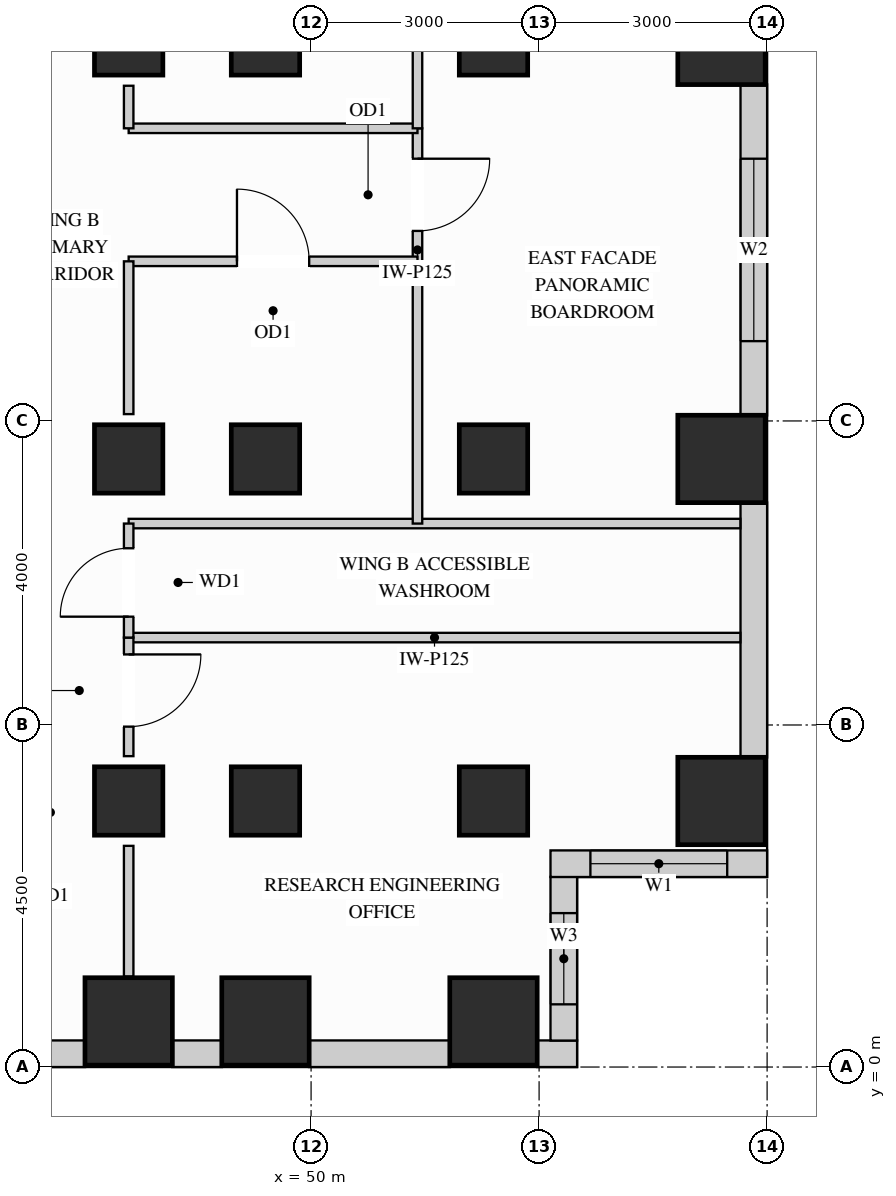
"""IFC4 building model, lengths in metres.
Left out: names, types, materials, properties, quantities, classifications, styles, units other than length and angle.
Written with IfcOpenShell. Run it as: python <this file> out.ifc"""

import sys

from ifc_helpers import new_model, si_unit, direction, frame, frame_2d, origin, origin_2d, place, context, subcontext, project, spatial, rectangle, extrude, source, transform, mapped, element, fill, save


model = new_model("IFC4")
c1 = context("Model", 3, precision=1e-05, world=origin(), true_north=direction((0.0, 1.0)))
c2 = subcontext(c1, "Body", "Model", "MODEL_VIEW")
j1 = project(units=[si_unit("LENGTHUNIT", "METRE"), si_unit("PLANEANGLEUNIT", "RADIAN")], contexts=[c1])
p1 = place(None, origin())
s1 = spatial("IfcSite", under=j1, at=p1, CompositionType="ELEMENT")
p2 = place(p1, origin())
s2 = spatial("IfcBuilding", under=s1, at=p2, CompositionType="ELEMENT")
p3 = place(p2, frame((0.0, 0.0, 95.4)))
s3 = spatial("IfcBuildingStorey", under=s2, at=p3, CompositionType="ELEMENT", Elevation=95.4)
m1 = source(origin(), c2, "Body", "SweptSolid", [
    extrude(rectangle(XDim=0.9, YDim=0.9, at=origin_2d()), origin(), (0.0, 0.0, 1.0), 3.38),
])
for number, where, z_axis, x_axis in (
    (1, (47.6, 13.5, 0.0), (0.0, 0.0, 1.0), (1.0, 0.0, 0.0)),
    (2, (47.6, 3.5, 0.0), (0.0, 0.0, 1.0), (1.0, 0.0, 0.0)),
    (3, (47.6, 8.0, 0.0), (0.0, 0.0, 1.0), (1.0, 0.0, 0.0)),
    (4, (49.4, 13.5, 0.0), (0.0, 0.0, 1.0), (1.0, 0.0, 0.0)),
    (5, (49.4, 3.5, 0.0), (0.0, 0.0, 1.0), (1.0, 0.0, 0.0)),
    (6, (49.4, 8.0, 0.0), (0.0, 0.0, 1.0), (1.0, 0.0, 0.0)),
    (7, (52.4, 13.5, 0.0), (0.0, 0.0, 1.0), (1.0, 0.0, 0.0)),
    (8, (52.4, 3.5, 0.0), (0.0, 0.0, 1.0), (1.0, 0.0, 0.0)),
    (9, (52.4, 8.0, 0.0), (0.0, 0.0, 1.0), (1.0, 0.0, 0.0)),
):
    element("IfcColumn", number, at=place(p3, frame(where, z_axis=z_axis, x_axis=x_axis)), inside=s3, PredefinedType="COLUMN", context=c2, shape_type="MappedRepresentation", body=[
        mapped(m1, transform((0.0, 0.0, 0.0), x_axis=(1.0, 0.0, 0.0), y_axis=(0.0, 1.0, 0.0), z_axis=(0.0, 0.0, 1.0))),
    ])
m2 = source(origin(), c2, "Body", "SweptSolid", [
    extrude(rectangle(XDim=1.15, YDim=1.15, at=origin_2d()), origin(), (0.0, 0.0, 1.0), 3.38),
])
for number, where, z_axis, x_axis in (
    (10, (55.4, 13.5, 0.0), (0.0, 0.0, 1.0), (1.0, 0.0, 0.0)),
    (11, (55.4, 3.5, 0.0), (0.0, 0.0, 1.0), (1.0, 0.0, 0.0)),
    (12, (55.4, 8.0, 0.0), (0.0, 0.0, 1.0), (1.0, 0.0, 0.0)),
    (13, (47.6, 0.6, 0.0), (0.0, 0.0, 1.0), (1.0, 0.0, 0.0)),
    (14, (49.4, 0.6, 0.0), (0.0, 0.0, 1.0), (1.0, 0.0, 0.0)),
    (15, (52.4, 0.6, 0.0), (0.0, 0.0, 1.0), (1.0, 0.0, 0.0)),
):
    element("IfcColumn", number, at=place(p3, frame(where, z_axis=z_axis, x_axis=x_axis)), inside=s3, PredefinedType="COLUMN", context=c2, shape_type="MappedRepresentation", body=[
        mapped(m2, transform((0.0, 0.0, 0.0), x_axis=(1.0, 0.0, 0.0), y_axis=(0.0, 1.0, 0.0), z_axis=(0.0, 0.0, 1.0))),
    ])
p4 = place(p3, frame((40.573, 0.175, 0.0), z_axis=(0.0, 0.0, 1.0), x_axis=(1.0, 0.0, 0.0)))
e16 = element("IfcWall", 16, at=p4, inside=s3, PredefinedType="SOLIDWALL", context=c2, shape_type="SweptSolid", body=[
    extrude(rectangle(XDim=6.454, YDim=0.35, at=frame_2d((3.227, 0.0))), origin(), (0.0, 0.0, 1.0), 3.365),
])
p5 = place(p4, frame((0.712, 0.0, 0.78)))
e17 = element("IfcOpeningElement", 17, at=p5, cuts=e16, PredefinedType="OPENING", context=c2, shape_type="SweptSolid", body=[
    extrude(rectangle(XDim=1.8, YDim=2.1, at=frame_2d((0.9, 1.05))), frame((0.0, 0.185, 0.0), z_axis=(0.0, -1.0, 0.0), x_axis=(1.0, 0.0, 0.0)), (0.0, 0.0, 1.0), 0.37),
])
p6 = place(p4, frame((2.905, 0.0, 0.78)))
e18 = element("IfcOpeningElement", 18, at=p6, cuts=e16, PredefinedType="OPENING", context=c2, shape_type="SweptSolid", body=[
    extrude(rectangle(XDim=1.8, YDim=2.1, at=frame_2d((0.9, 1.05))), frame((0.0, 0.185, 0.0), z_axis=(0.0, -1.0, 0.0), x_axis=(1.0, 0.0, 0.0)), (0.0, 0.0, 1.0), 0.37),
])
m3 = source(origin(), c2, "Body", "SweptSolid", [
    extrude(rectangle(XDim=0.654, YDim=0.35, at=frame_2d((0.327, 0.0))), origin(), (0.0, 0.0, 1.0), 3.365),
])
p7 = place(p3, frame((48.173, 0.175, 0.0), z_axis=(0.0, 0.0, 1.0), x_axis=(1.0, 0.0, 0.0)))
e19 = element("IfcWall", 19, at=p7, inside=s3, PredefinedType="SOLIDWALL", context=c2, shape_type="MappedRepresentation", body=[
    mapped(m3, transform((0.0, 0.0, 0.0), x_axis=(1.0, 0.0, 0.0), y_axis=(0.0, 1.0, 0.0), z_axis=(0.0, 0.0, 1.0))),
])
m4 = source(origin(), c2, "Body", "SweptSolid", [
    extrude(rectangle(XDim=1.854, YDim=0.35, at=frame_2d((0.927, 0.0))), origin(), (0.0, 0.0, 1.0), 3.365),
])
p8 = place(p3, frame((49.973, 0.175, 0.0), z_axis=(0.0, 0.0, 1.0), x_axis=(1.0, 0.0, 0.0)))
e20 = element("IfcWall", 20, at=p8, inside=s3, PredefinedType="SOLIDWALL", context=c2, shape_type="MappedRepresentation", body=[
    mapped(m4, transform((0.0, 0.0, 0.0), x_axis=(1.0, 0.0, 0.0), y_axis=(0.0, 1.0, 0.0), z_axis=(0.0, 0.0, 1.0))),
])
m5 = source(origin(), c2, "Body", "SweptSolid", [
    extrude(rectangle(XDim=0.527, YDim=0.35, at=frame_2d((0.264, 0.0))), origin(), (0.0, 0.0, 1.0), 3.365),
])
p9 = place(p3, frame((52.973, 0.175, 0.0), z_axis=(0.0, 0.0, 1.0), x_axis=(1.0, 0.0, 0.0)))
e21 = element("IfcWall", 21, at=p9, inside=s3, PredefinedType="SOLIDWALL", context=c2, shape_type="MappedRepresentation", body=[
    mapped(m5, transform((0.0, 0.0, 0.0), x_axis=(1.0, 0.0, 0.0), y_axis=(0.0, 1.0, 0.0), z_axis=(0.0, 0.0, 1.0))),
])
p10 = place(p3, frame((53.325, 0.348, 0.0), z_axis=(0.0, 0.0, 1.0), x_axis=(0.0, 1.0, 0.0)))
e22 = element("IfcWall", 22, at=p10, inside=s3, PredefinedType="SOLIDWALL", context=c2, shape_type="SweptSolid", body=[
    extrude(rectangle(XDim=2.154, YDim=0.35, at=frame_2d((1.077, 0.0))), origin(), (0.0, 0.0, 1.0), 3.365),
])
p11 = place(p10, frame((0.477, 0.0, 0.78)))
e23 = element("IfcOpeningElement", 23, at=p11, cuts=e22, PredefinedType="OPENING", context=c2, shape_type="SweptSolid", body=[
    extrude(rectangle(XDim=1.2, YDim=2.1, at=frame_2d((0.6, 1.05))), frame((0.0, 0.185, 0.0), z_axis=(0.0, -1.0, 0.0), x_axis=(1.0, 0.0, 0.0)), (0.0, 0.0, 1.0), 0.37),
])
p12 = place(p3, frame((53.15, 2.675, 0.0), z_axis=(0.0, 0.0, 1.0), x_axis=(1.0, 0.0, 0.0)))
e24 = element("IfcWall", 24, at=p12, inside=s3, PredefinedType="SOLIDWALL", context=c2, shape_type="SweptSolid", body=[
    extrude(rectangle(XDim=2.85, YDim=0.35, at=frame_2d((1.425, 0.0))), origin(), (0.0, 0.0, 1.0), 3.365),
])
p13 = place(p12, frame((0.525, 0.0, 0.78)))
e25 = element("IfcOpeningElement", 25, at=p13, cuts=e24, PredefinedType="OPENING", context=c2, shape_type="SweptSolid", body=[
    extrude(rectangle(XDim=1.8, YDim=2.1, at=frame_2d((0.9, 1.05))), frame((0.0, 0.185, 0.0), z_axis=(0.0, -1.0, 0.0), x_axis=(1.0, 0.0, 0.0)), (0.0, 0.0, 1.0), 0.37),
])
m6 = source(origin(), c2, "Body", "SweptSolid", [
    extrude(rectangle(XDim=3.354, YDim=0.35, at=frame_2d((1.677, 0.0))), origin(), (0.0, 0.0, 1.0), 3.365),
])
p14 = place(p3, frame((55.825, 4.073, 0.0), z_axis=(0.0, 0.0, 1.0), x_axis=(0.0, 1.0, 0.0)))
e26 = element("IfcWall", 26, at=p14, inside=s3, PredefinedType="SOLIDWALL", context=c2, shape_type="MappedRepresentation", body=[
    mapped(m6, transform((0.0, 0.0, 0.0), x_axis=(1.0, 0.0, 0.0), y_axis=(0.0, 1.0, 0.0), z_axis=(0.0, 0.0, 1.0))),
])
p15 = place(p3, frame((55.825, 8.573, 0.0), z_axis=(0.0, 0.0, 1.0), x_axis=(0.0, 1.0, 0.0)))
e27 = element("IfcWall", 27, at=p15, inside=s3, PredefinedType="SOLIDWALL", context=c2, shape_type="SweptSolid", body=[
    extrude(rectangle(XDim=4.354, YDim=0.35, at=frame_2d((2.177, 0.0))), origin(), (0.0, 0.0, 1.0), 3.365),
])
p16 = place(p15, frame((0.977, 0.0, 0.78)))
e28 = element("IfcOpeningElement", 28, at=p16, cuts=e27, PredefinedType="OPENING", context=c2, shape_type="SweptSolid", body=[
    extrude(rectangle(XDim=2.4, YDim=2.1, at=frame_2d((1.2, 1.05))), frame((0.0, 0.185, 0.0), z_axis=(0.0, -1.0, 0.0), x_axis=(1.0, 0.0, 0.0)), (0.0, 0.0, 1.0), 0.37),
])
p17 = place(p3, frame((51.4, 10.6, 0.0), z_axis=(0.0, 0.0, 1.0), x_axis=(0.0, 1.0, 0.0)))
e29 = element("IfcWall", 29, at=p17, inside=s3, PredefinedType="PARTITIONING", context=c2, shape_type="SweptSolid", body=[
    extrude(rectangle(XDim=1.75, YDim=0.125, at=frame_2d((0.875, 0.0))), origin(), (0.0, 0.0, 1.0), 3.365),
])
p18 = place(p17, frame((0.4, 0.0, 0.0)))
e30 = element("IfcOpeningElement", 30, at=p18, cuts=e29, PredefinedType="OPENING", context=c2, shape_type="SweptSolid", body=[
    extrude(rectangle(XDim=0.95, YDim=2.15, at=frame_2d((0.475, 1.075))), frame((0.0, 0.073, 0.0), z_axis=(0.0, -1.0, 0.0), x_axis=(1.0, 0.0, 0.0)), (0.0, 0.0, 1.0), 0.145),
])
m7 = source(origin(), c2, "Body", "SweptSolid", [
    extrude(rectangle(XDim=8.048, YDim=0.125, at=frame_2d((4.024, 0.0))), origin(), (0.0, 0.0, 1.0), 3.365),
])
for number, where, z_axis, x_axis in (
    (31, (47.6, 5.65, 0.0), (0.0, 0.0, 1.0), (1.0, 0.0, 0.0)),
    (32, (47.6, 7.15, 0.0), (0.0, 0.0, 1.0), (1.0, 0.0, 0.0)),
):
    element("IfcWall", number, at=place(p3, frame(where, z_axis=z_axis, x_axis=x_axis)), inside=s3, PredefinedType="PARTITIONING", context=c2, shape_type="MappedRepresentation", body=[
        mapped(m7, transform((0.0, 0.0, 0.0), x_axis=(1.0, 0.0, 0.0), y_axis=(0.0, 1.0, 0.0), z_axis=(0.0, 0.0, 1.0))),
    ])
m8 = source(origin(), c2, "Body", "SweptSolid", [
    extrude(rectangle(XDim=3.8, YDim=0.125, at=frame_2d((1.9, 0.0))), origin(), (0.0, 0.0, 1.0), 3.365),
])
p19 = place(p3, frame((47.6, 12.35, 0.0), z_axis=(0.0, 0.0, 1.0), x_axis=(1.0, 0.0, 0.0)))
e33 = element("IfcWall", 33, at=p19, inside=s3, PredefinedType="PARTITIONING", context=c2, shape_type="MappedRepresentation", body=[
    mapped(m8, transform((0.0, 0.0, 0.0), x_axis=(1.0, 0.0, 0.0), y_axis=(0.0, 1.0, 0.0), z_axis=(0.0, 0.0, 1.0))),
])
p20 = place(p3, frame((47.6, 10.6, 0.0), z_axis=(0.0, 0.0, 1.0), x_axis=(1.0, 0.0, 0.0)))
e34 = element("IfcWall", 34, at=p20, inside=s3, PredefinedType="PARTITIONING", context=c2, shape_type="SweptSolid", body=[
    extrude(rectangle(XDim=3.8, YDim=0.125, at=frame_2d((1.9, 0.0))), origin(), (0.0, 0.0, 1.0), 2.677),
])
p21 = place(p20, frame((1.425, 0.0, 0.0)))
e35 = element("IfcOpeningElement", 35, at=p21, cuts=e34, PredefinedType="OPENING", context=c2, shape_type="SweptSolid", body=[
    extrude(rectangle(XDim=0.95, YDim=2.15, at=frame_2d((0.475, 1.075))), frame((0.0, 0.073, 0.0), z_axis=(0.0, -1.0, 0.0), x_axis=(1.0, 0.0, 0.0)), (0.0, 0.0, 1.0), 0.145),
])
m9 = source(origin(), c2, "Body", "SweptSolid", [
    extrude(rectangle(XDim=3.45, YDim=0.125, at=frame_2d((1.725, 0.0))), origin(), (0.0, 0.0, 1.0), 3.365),
])
p22 = place(p3, frame((51.4, 7.15, 0.0), z_axis=(0.0, 0.0, 1.0), x_axis=(0.0, 1.0, 0.0)))
e36 = element("IfcWall", 36, at=p22, inside=s3, PredefinedType="PARTITIONING", context=c2, shape_type="MappedRepresentation", body=[
    mapped(m9, transform((0.0, 0.0, 0.0), x_axis=(1.0, 0.0, 0.0), y_axis=(0.0, 1.0, 0.0), z_axis=(0.0, 0.0, 1.0))),
])
m10 = source(origin(), c2, "Body", "SweptSolid", [
    extrude(rectangle(XDim=9.79, YDim=0.125, at=frame_2d((4.895, 0.0))), origin(), (0.0, 0.0, 1.0), 3.365),
])
p23 = place(p3, frame((51.4, 12.35, 0.0), z_axis=(0.0, 0.0, 1.0), x_axis=(0.0, 1.0, 0.0)))
e37 = element("IfcWall", 37, at=p23, inside=s3, PredefinedType="PARTITIONING", context=c2, shape_type="MappedRepresentation", body=[
    mapped(m10, transform((0.0, 0.0, 0.0), x_axis=(1.0, 0.0, 0.0), y_axis=(0.0, 1.0, 0.0), z_axis=(0.0, 0.0, 1.0))),
])
p24 = place(p3, frame((47.6, 4.09, 0.0), z_axis=(0.0, 0.0, 1.0), x_axis=(0.0, 1.0, 0.0)))
e38 = element("IfcWall", 38, at=p24, inside=s3, PredefinedType="PARTITIONING", context=c2, shape_type="SweptSolid", body=[
    extrude(rectangle(XDim=1.56, YDim=0.125, at=frame_2d((0.78, 0.0))), origin(), (0.0, 0.0, 1.0), 2.677),
])
p25 = place(p24, frame((0.388, 0.0, 0.0)))
e39 = element("IfcOpeningElement", 39, at=p25, cuts=e38, PredefinedType="OPENING", context=c2, shape_type="SweptSolid", body=[
    extrude(rectangle(XDim=0.95, YDim=2.15, at=frame_2d((0.475, 1.075))), frame((0.0, 0.073, 0.0), z_axis=(0.0, -1.0, 0.0), x_axis=(1.0, 0.0, 0.0)), (0.0, 0.0, 1.0), 0.145),
])
m11 = source(origin(), c2, "Body", "SweptSolid", [
    extrude(rectangle(XDim=1.72, YDim=0.125, at=frame_2d((0.86, 0.0))), origin(), (0.0, 0.0, 1.0), 2.677),
])
p26 = place(p3, frame((47.6, 1.19, 0.0), z_axis=(0.0, 0.0, 1.0), x_axis=(0.0, 1.0, 0.0)))
e40 = element("IfcWall", 40, at=p26, inside=s3, PredefinedType="PARTITIONING", context=c2, shape_type="MappedRepresentation", body=[
    mapped(m11, transform((0.0, 0.0, 0.0), x_axis=(1.0, 0.0, 0.0), y_axis=(0.0, 1.0, 0.0), z_axis=(0.0, 0.0, 1.0))),
])
m12 = source(origin(), c2, "Body", "SweptSolid", [
    extrude(rectangle(XDim=2.01, YDim=0.125, at=frame_2d((1.005, 0.0))), origin(), (0.0, 0.0, 1.0), 2.677),
])
p27 = place(p3, frame((47.6, 8.59, 0.0), z_axis=(0.0, 0.0, 1.0), x_axis=(0.0, 1.0, 0.0)))
e41 = element("IfcWall", 41, at=p27, inside=s3, PredefinedType="PARTITIONING", context=c2, shape_type="MappedRepresentation", body=[
    mapped(m12, transform((0.0, 0.0, 0.0), x_axis=(1.0, 0.0, 0.0), y_axis=(0.0, 1.0, 0.0), z_axis=(0.0, 0.0, 1.0))),
])
m13 = source(origin(), c2, "Body", "SweptSolid", [
    extrude(rectangle(XDim=0.56, YDim=0.125, at=frame_2d((0.28, 0.0))), origin(), (0.0, 0.0, 1.0), 2.677),
])
p28 = place(p3, frame((47.6, 12.35, 0.0), z_axis=(0.0, 0.0, 1.0), x_axis=(0.0, 1.0, 0.0)))
e42 = element("IfcWall", 42, at=p28, inside=s3, PredefinedType="PARTITIONING", context=c2, shape_type="MappedRepresentation", body=[
    mapped(m13, transform((0.0, 0.0, 0.0), x_axis=(1.0, 0.0, 0.0), y_axis=(0.0, 1.0, 0.0), z_axis=(0.0, 0.0, 1.0))),
])
p29 = place(p3, frame((47.6, 5.65, 0.0), z_axis=(0.0, 0.0, 1.0), x_axis=(0.0, 1.0, 0.0)))
e43 = element("IfcWall", 43, at=p29, inside=s3, PredefinedType="PARTITIONING", context=c2, shape_type="SweptSolid", body=[
    extrude(rectangle(XDim=1.5, YDim=0.125, at=frame_2d((0.75, 0.0))), origin(), (0.0, 0.0, 1.0), 2.677),
])
p30 = place(p29, frame((0.275, 0.0, 0.0)))
e44 = element("IfcOpeningElement", 44, at=p30, cuts=e43, PredefinedType="OPENING", context=c2, shape_type="SweptSolid", body=[
    extrude(rectangle(XDim=0.9, YDim=2.15, at=frame_2d((0.45, 1.075))), frame((0.0, 0.073, 0.0), z_axis=(0.0, -1.0, 0.0), x_axis=(1.0, 0.0, 0.0)), (0.0, 0.0, 1.0), 0.145),
])
m14 = source(origin(), c2, "Body", "SweptSolid", [
    extrude(rectangle(XDim=0.95, YDim=2.15, at=frame_2d((0.475, 1.075))), frame((0.0, 0.025, 0.0), z_axis=(0.0, -1.0, 0.0), x_axis=(1.0, 0.0, 0.0)), (0.0, 0.0, 1.0), 0.05),
])
p31 = place(p25, origin())
e45 = element("IfcDoor", 45, at=p31, inside=s3, OperationType="SINGLE_SWING_RIGHT", PredefinedType="DOOR", context=c2, shape_type="MappedRepresentation", body=[
    mapped(m14, transform((0.0, 0.0, 0.0), x_axis=(1.0, 0.0, 0.0), y_axis=(0.0, 1.0, 0.0), z_axis=(0.0, 0.0, 1.0))),
])
fill(e39, e45)
p32 = place(p21, origin())
e46 = element("IfcDoor", 46, at=p32, inside=s3, OperationType="SINGLE_SWING_LEFT", PredefinedType="DOOR", context=c2, shape_type="MappedRepresentation", body=[
    mapped(m14, transform((0.0, 0.0, 0.0), x_axis=(1.0, 0.0, 0.0), y_axis=(0.0, 1.0, 0.0), z_axis=(0.0, 0.0, 1.0))),
])
fill(e35, e46)
p33 = place(p18, origin())
e47 = element("IfcDoor", 47, at=p33, inside=s3, OperationType="SINGLE_SWING_RIGHT", PredefinedType="DOOR", context=c2, shape_type="MappedRepresentation", body=[
    mapped(m14, transform((0.0, 0.0, 0.0), x_axis=(1.0, 0.0, 0.0), y_axis=(0.0, 1.0, 0.0), z_axis=(0.0, 0.0, 1.0))),
])
fill(e30, e47)
m15 = source(origin(), c2, "Body", "SweptSolid", [
    extrude(rectangle(XDim=0.9, YDim=2.15, at=frame_2d((0.45, 1.075))), frame((0.0, 0.025, 0.0), z_axis=(0.0, -1.0, 0.0), x_axis=(1.0, 0.0, 0.0)), (0.0, 0.0, 1.0), 0.05),
])
p34 = place(p30, origin())
e48 = element("IfcDoor", 48, at=p34, inside=s3, OperationType="SINGLE_SWING_LEFT", PredefinedType="DOOR", context=c2, shape_type="MappedRepresentation", body=[
    mapped(m15, transform((0.0, 0.0, 0.0), x_axis=(1.0, 0.0, 0.0), y_axis=(0.0, 1.0, 0.0), z_axis=(0.0, 0.0, 1.0))),
])
fill(e44, e48)
m16 = source(origin(), c2, "Body", "SweptSolid", [
    extrude(rectangle(XDim=1.8, YDim=2.1, at=frame_2d((0.9, 1.05))), frame((0.0, 0.03, 0.0), z_axis=(0.0, -1.0, 0.0), x_axis=(1.0, 0.0, 0.0)), (0.0, 0.0, 1.0), 0.06),
])
p35 = place(p13, origin())
e49 = element("IfcWindow", 49, at=p35, inside=s3, PartitioningType="SINGLE_PANEL", PredefinedType="WINDOW", context=c2, shape_type="MappedRepresentation", body=[
    mapped(m16, transform((0.0, 0.0, 0.0), x_axis=(1.0, 0.0, 0.0), y_axis=(0.0, 1.0, 0.0), z_axis=(0.0, 0.0, 1.0))),
])
fill(e25, e49)
m17 = source(origin(), c2, "Body", "SweptSolid", [
    extrude(rectangle(XDim=2.4, YDim=2.1, at=frame_2d((1.2, 1.05))), frame((0.0, 0.03, 0.0), z_axis=(0.0, -1.0, 0.0), x_axis=(1.0, 0.0, 0.0)), (0.0, 0.0, 1.0), 0.06),
])
p36 = place(p16, origin())
e50 = element("IfcWindow", 50, at=p36, inside=s3, PartitioningType="SINGLE_PANEL", PredefinedType="WINDOW", context=c2, shape_type="MappedRepresentation", body=[
    mapped(m17, transform((0.0, 0.0, 0.0), x_axis=(1.0, 0.0, 0.0), y_axis=(0.0, 1.0, 0.0), z_axis=(0.0, 0.0, 1.0))),
])
fill(e28, e50)
m18 = source(origin(), c2, "Body", "SweptSolid", [
    extrude(rectangle(XDim=1.2, YDim=2.1, at=frame_2d((0.6, 1.05))), frame((0.0, 0.03, 0.0), z_axis=(0.0, -1.0, 0.0), x_axis=(1.0, 0.0, 0.0)), (0.0, 0.0, 1.0), 0.06),
])
p37 = place(p11, origin())
e51 = element("IfcWindow", 51, at=p37, inside=s3, PartitioningType="SINGLE_PANEL", PredefinedType="WINDOW", context=c2, shape_type="MappedRepresentation", body=[
    mapped(m18, transform((0.0, 0.0, 0.0), x_axis=(1.0, 0.0, 0.0), y_axis=(0.0, 1.0, 0.0), z_axis=(0.0, 0.0, 1.0))),
])
fill(e23, e51)
save(model, sys.argv[1])
